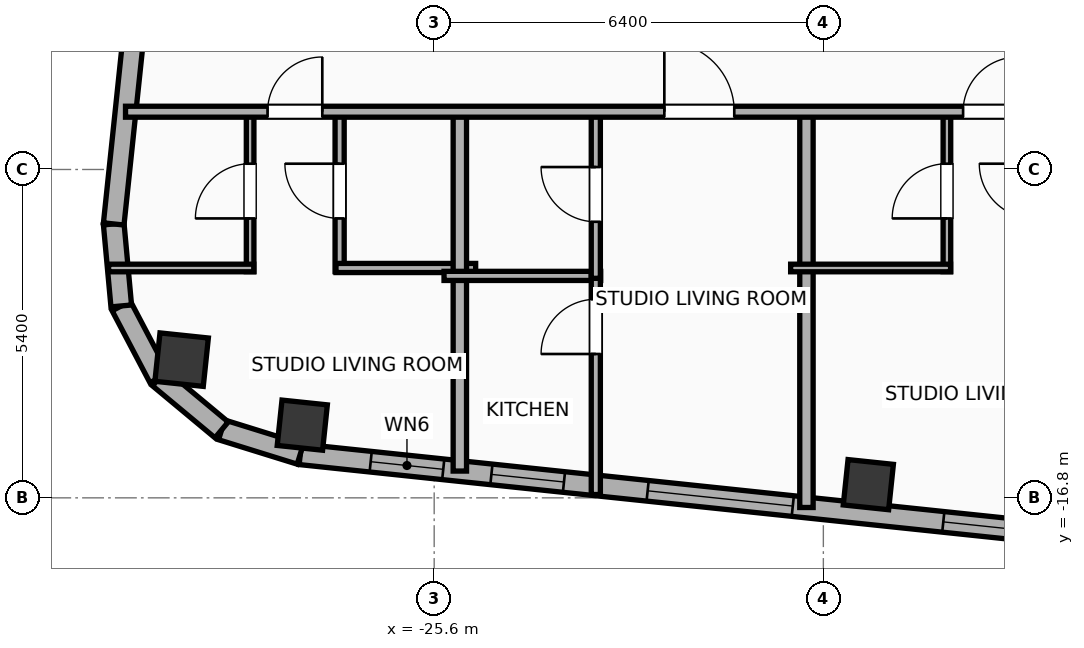
"""IFC4 building model, lengths in metres.
Left out: names, types, materials, properties, quantities, classifications, styles, units other than length and angle.
Written with IfcOpenShell. Run it as: python <this file> out.ifc"""

import sys

from ifc_helpers import new_model, si_unit, direction, frame, frame_2d, origin, origin_2d, place, context, subcontext, project, spatial, rectangle, hollow_rectangle, hollow_circle, extrude, element, fill, save


model = new_model("IFC4")
c1 = context("Model", 3, precision=1e-05, world=origin(), true_north=direction((0.0, 1.0)))
c2 = subcontext(c1, "Body", "Model", "MODEL_VIEW")
j1 = project(units=[si_unit("LENGTHUNIT", "METRE"), si_unit("PLANEANGLEUNIT", "RADIAN")], contexts=[c1])
p1 = place(None, origin())
s1 = spatial("IfcSite", under=j1, at=p1, CompositionType="ELEMENT")
p2 = place(p1, origin())
s2 = spatial("IfcBuilding", under=s1, at=p2, CompositionType="ELEMENT")
p3 = place(p2, frame((0.0, 0.0, 263.9)))
s3 = spatial("IfcBuildingStorey", under=s2, at=p3, CompositionType="ELEMENT", Elevation=263.9)
for number, where, z_axis, x_axis in (
    (1, (-27.769, -15.604, 0.0), (0.0, 0.0, 1.0), (0.995, -0.105, 0.0)),
    (2, (-18.46, -16.583, 0.0), (0.0, 0.0, 1.0), (0.995, -0.105, 0.0)),
):
    element("IfcColumn", number, at=place(p3, frame(where, z_axis=z_axis, x_axis=x_axis)), inside=s3, PredefinedType="COLUMN", context=c2, shape_type="SweptSolid", body=[
        extrude(hollow_rectangle(XDim=0.75, YDim=0.75, WallThickness=0.025, at=origin_2d()), origin(), (0.0, 0.0, 1.0), 3.9),
    ])
p4 = place(p3, frame((-29.753, -14.527, 0.0), z_axis=(0.0, 0.0, 1.0), x_axis=(0.994521895368, -0.104528463268, 0.0)))
e3 = element("IfcColumn", 3, at=p4, inside=s3, PredefinedType="COLUMN", context=c2, shape_type="SweptSolid", body=[
    extrude(hollow_circle(Radius=0.4, WallThickness=0.028, at=origin_2d()), origin(), (0.0, 0.0, 1.0), 3.9),
])
p5 = place(p3, frame((18.708, -20.972, 0.0), z_axis=(0.0, 0.0, 1.0), x_axis=(-0.994521888554, 0.104528528102, 0.0)))
e4 = element("IfcWall", 4, at=p5, inside=s3, PredefinedType="ELEMENTEDWALL", context=c2, shape_type="SweptSolid", body=[
    extrude(rectangle(XDim=46.766, YDim=0.34, at=frame_2d((23.383, 0.0))), origin(), (0.0, 0.0, 1.0), 3.65),
])
p6 = place(p5, frame((23.833, 0.0, 0.75)))
e5 = element("IfcOpeningElement", 5, at=p6, cuts=e4, PredefinedType="OPENING", context=c2, shape_type="SweptSolid", body=[
    extrude(rectangle(XDim=2.4, YDim=2.1, at=frame_2d((1.2, 1.05))), frame((0.0, 0.18, 0.0), z_axis=(0.0, -1.0, 0.0), x_axis=(1.0, 0.0, 0.0)), (0.0, 0.0, 1.0), 0.36),
])
p7 = place(p5, frame((38.622, 0.0, 0.75)))
e6 = element("IfcOpeningElement", 6, at=p7, cuts=e4, PredefinedType="OPENING", context=c2, shape_type="SweptSolid", body=[
    extrude(rectangle(XDim=2.4, YDim=2.1, at=frame_2d((1.2, 1.05))), frame((0.0, 0.18, 0.0), z_axis=(0.0, -1.0, 0.0), x_axis=(1.0, 0.0, 0.0)), (0.0, 0.0, 1.0), 0.36),
])
p8 = place(p5, frame((44.402, 0.0, 0.75)))
e7 = element("IfcOpeningElement", 7, at=p8, cuts=e4, PredefinedType="OPENING", context=c2, shape_type="SweptSolid", body=[
    extrude(rectangle(XDim=1.2, YDim=2.05, at=frame_2d((0.6, 1.025))), frame((0.0, 0.18, 0.0), z_axis=(0.0, -1.0, 0.0), x_axis=(1.0, 0.0, 0.0)), (0.0, 0.0, 1.0), 0.36),
])
p9 = place(p5, frame((42.406, 0.0, 0.75)))
e8 = element("IfcOpeningElement", 8, at=p9, cuts=e4, PredefinedType="OPENING", context=c2, shape_type="SweptSolid", body=[
    extrude(rectangle(XDim=1.2, YDim=2.05, at=frame_2d((0.6, 1.025))), frame((0.0, 0.18, 0.0), z_axis=(0.0, -1.0, 0.0), x_axis=(1.0, 0.0, 0.0)), (0.0, 0.0, 1.0), 0.36),
])
p10 = place(p5, frame((34.933, 0.0, 0.75)))
e9 = element("IfcOpeningElement", 9, at=p10, cuts=e4, PredefinedType="OPENING", context=c2, shape_type="SweptSolid", body=[
    extrude(rectangle(XDim=1.2, YDim=2.05, at=frame_2d((0.6, 1.025))), frame((0.0, 0.18, 0.0), z_axis=(0.0, -1.0, 0.0), x_axis=(1.0, 0.0, 0.0)), (0.0, 0.0, 1.0), 0.36),
])
p11 = place(p5, frame((28.631, 0.0, 0.75)))
e10 = element("IfcOpeningElement", 10, at=p11, cuts=e4, PredefinedType="OPENING", context=c2, shape_type="SweptSolid", body=[
    extrude(rectangle(XDim=1.2, YDim=2.05, at=frame_2d((0.6, 1.025))), frame((0.0, 0.18, 0.0), z_axis=(0.0, -1.0, 0.0), x_axis=(1.0, 0.0, 0.0)), (0.0, 0.0, 1.0), 0.36),
])
p12 = place(p5, frame((30.896, 0.0, 0.75)))
e11 = element("IfcOpeningElement", 11, at=p12, cuts=e4, PredefinedType="OPENING", context=c2, shape_type="SweptSolid", body=[
    extrude(rectangle(XDim=1.2, YDim=2.05, at=frame_2d((0.6, 1.025))), frame((0.0, 0.18, 0.0), z_axis=(0.0, -1.0, 0.0), x_axis=(1.0, 0.0, 0.0)), (0.0, 0.0, 1.0), 0.36),
])
p13 = place(p5, frame((7.501, 0.0, 0.75)))
e12 = element("IfcOpeningElement", 12, at=p13, cuts=e4, PredefinedType="OPENING", context=c2, shape_type="SweptSolid", body=[
    extrude(rectangle(XDim=1.2, YDim=2.05, at=frame_2d((0.6, 1.025))), frame((0.0, 0.18, 0.0), z_axis=(0.0, -1.0, 0.0), x_axis=(1.0, 0.0, 0.0)), (0.0, 0.0, 1.0), 0.36),
])
p14 = place(p5, frame((4.159, 0.0, 0.75)))
e13 = element("IfcOpeningElement", 13, at=p14, cuts=e4, PredefinedType="OPENING", context=c2, shape_type="SweptSolid", body=[
    extrude(rectangle(XDim=1.2, YDim=2.05, at=frame_2d((0.6, 1.025))), frame((0.0, 0.18, 0.0), z_axis=(0.0, -1.0, 0.0), x_axis=(1.0, 0.0, 0.0)), (0.0, 0.0, 1.0), 0.36),
])
p15 = place(p5, frame((1.369, 0.0, 0.75)))
e14 = element("IfcOpeningElement", 14, at=p15, cuts=e4, PredefinedType="OPENING", context=c2, shape_type="SweptSolid", body=[
    extrude(rectangle(XDim=1.2, YDim=2.05, at=frame_2d((0.6, 1.025))), frame((0.0, 0.18, 0.0), z_axis=(0.0, -1.0, 0.0), x_axis=(1.0, 0.0, 0.0)), (0.0, 0.0, 1.0), 0.36),
])
p16 = place(p5, frame((20.254, 0.0, 0.75)))
e15 = element("IfcOpeningElement", 15, at=p16, cuts=e4, PredefinedType="OPENING", context=c2, shape_type="SweptSolid", body=[
    extrude(rectangle(XDim=1.2, YDim=2.05, at=frame_2d((0.6, 1.025))), frame((0.0, 0.18, 0.0), z_axis=(0.0, -1.0, 0.0), x_axis=(1.0, 0.0, 0.0)), (0.0, 0.0, 1.0), 0.36),
])
p17 = place(p5, frame((16.172, 0.0, 0.75)))
e16 = element("IfcOpeningElement", 16, at=p17, cuts=e4, PredefinedType="OPENING", context=c2, shape_type="SweptSolid", body=[
    extrude(rectangle(XDim=1.2, YDim=2.05, at=frame_2d((0.6, 1.025))), frame((0.0, 0.18, 0.0), z_axis=(0.0, -1.0, 0.0), x_axis=(1.0, 0.0, 0.0)), (0.0, 0.0, 1.0), 0.36),
])
p18 = place(p5, frame((12.11, 0.0, 0.75)))
e17 = element("IfcOpeningElement", 17, at=p18, cuts=e4, PredefinedType="OPENING", context=c2, shape_type="SweptSolid", body=[
    extrude(rectangle(XDim=1.2, YDim=2.05, at=frame_2d((0.6, 1.025))), frame((0.0, 0.18, 0.0), z_axis=(0.0, -1.0, 0.0), x_axis=(1.0, 0.0, 0.0)), (0.0, 0.0, 1.0), 0.36),
])
p19 = place(p3, frame((-27.802, -16.084, 0.0), z_axis=(0.0, 0.0, 1.0), x_axis=(-0.955007802701, 0.296580674994, 0.0)))
e18 = element("IfcWall", 18, at=p19, inside=s3, PredefinedType="ELEMENTEDWALL", context=c2, shape_type="SweptSolid", body=[
    extrude(rectangle(XDim=1.354, YDim=0.34, at=frame_2d((0.677, 0.0))), origin(), (0.0, 0.0, 1.0), 3.65),
])
p20 = place(p3, frame((-29.096, -15.682, 0.0), z_axis=(0.0, 0.0, 1.0), x_axis=(-0.768864427906, 0.639411832469, 0.0)))
e19 = element("IfcWall", 19, at=p20, inside=s3, PredefinedType="ELEMENTEDWALL", context=c2, shape_type="SweptSolid", body=[
    extrude(rectangle(XDim=1.337, YDim=0.34, at=frame_2d((0.668, 0.0))), origin(), (0.0, 0.0, 1.0), 3.65),
])
p21 = place(p3, frame((-30.124, -14.827, 0.0), z_axis=(0.0, 0.0, 1.0), x_axis=(-0.465528132217, 0.885033083062, 0.0)))
e20 = element("IfcWall", 20, at=p21, inside=s3, PredefinedType="ELEMENTEDWALL", context=c2, shape_type="SweptSolid", body=[
    extrude(rectangle(XDim=1.337, YDim=0.34, at=frame_2d((0.668, 0.0))), origin(), (0.0, 0.0, 1.0), 3.65),
])
p22 = place(p3, frame((-30.746, -13.644, 0.0), z_axis=(0.0, 0.0, 1.0), x_axis=(-0.091592370975, 0.995796584438, 0.0)))
e21 = element("IfcWall", 21, at=p22, inside=s3, PredefinedType="ELEMENTEDWALL", context=c2, shape_type="SweptSolid", body=[
    extrude(rectangle(XDim=1.354, YDim=0.34, at=frame_2d((0.677, 0.0))), origin(), (0.0, 0.0, 1.0), 3.65),
])
p23 = place(p3, frame((-30.87, -12.296, 0.0), z_axis=(0.0, 0.0, 1.0), x_axis=(0.104533282919, 0.994521388791, 0.0)))
e22 = element("IfcWall", 22, at=p23, inside=s3, PredefinedType="ELEMENTEDWALL", context=c2, shape_type="SweptSolid", body=[
    extrude(rectangle(XDim=30.366, YDim=0.34, at=frame_2d((15.183, 0.0))), origin(), (0.0, 0.0, 1.0), 3.65),
])
p24 = place(p23, frame((5.842, 0.0, 0.75)))
e23 = element("IfcOpeningElement", 23, at=p24, cuts=e22, PredefinedType="OPENING", context=c2, shape_type="SweptSolid", body=[
    extrude(rectangle(XDim=1.8, YDim=2.1, at=frame_2d((0.9, 1.05))), frame((0.0, 0.18, 0.0), z_axis=(0.0, -1.0, 0.0), x_axis=(1.0, 0.0, 0.0)), (0.0, 0.0, 1.0), 0.36),
])
p25 = place(p23, frame((26.861, 0.0, 0.75)))
e24 = element("IfcOpeningElement", 24, at=p25, cuts=e22, PredefinedType="OPENING", context=c2, shape_type="SweptSolid", body=[
    extrude(rectangle(XDim=1.2, YDim=2.05, at=frame_2d((0.6, 1.025))), frame((0.0, 0.18, 0.0), z_axis=(0.0, -1.0, 0.0), x_axis=(1.0, 0.0, 0.0)), (0.0, 0.0, 1.0), 0.36),
])
p26 = place(p23, frame((16.311, 0.0, 0.75)))
e25 = element("IfcOpeningElement", 25, at=p26, cuts=e22, PredefinedType="OPENING", context=c2, shape_type="SweptSolid", body=[
    extrude(rectangle(XDim=1.2, YDim=2.05, at=frame_2d((0.6, 1.025))), frame((0.0, 0.18, 0.0), z_axis=(0.0, -1.0, 0.0), x_axis=(1.0, 0.0, 0.0)), (0.0, 0.0, 1.0), 0.36),
])
p27 = place(p3, frame((-28.627, -13.08, 0.0), z_axis=(0.0, 0.0, 1.0), x_axis=(0.0, 1.0, 0.0)))
e26 = element("IfcWall", 26, at=p27, inside=s3, PredefinedType="PARTITIONING", context=c2, shape_type="SweptSolid", body=[
    extrude(rectangle(XDim=2.65, YDim=0.125, at=frame_2d((1.325, 0.0))), origin(), (0.0, 0.0, 1.0), 3.65),
])
p28 = place(p27, frame((0.875, 0.0, 0.0)))
e27 = element("IfcOpeningElement", 27, at=p28, cuts=e26, PredefinedType="OPENING", context=c2, shape_type="SweptSolid", body=[
    extrude(rectangle(XDim=0.9, YDim=2.05, at=frame_2d((0.45, 1.025))), frame((0.0, 0.073, 0.0), z_axis=(0.0, -1.0, 0.0), x_axis=(1.0, 0.0, 0.0)), (0.0, 0.0, 1.0), 0.145),
])
p29 = place(p3, frame((-27.155, -13.08, 0.0), z_axis=(0.0, 0.0, 1.0), x_axis=(0.0, 1.0, 0.0)))
e28 = element("IfcWall", 28, at=p29, inside=s3, PredefinedType="PLUMBINGWALL", context=c2, shape_type="SweptSolid", body=[
    extrude(rectangle(XDim=2.65, YDim=0.15, at=frame_2d((1.325, 0.0))), origin(), (0.0, 0.0, 1.0), 3.65),
])
p30 = place(p29, frame((0.875, 0.0, 0.0)))
e29 = element("IfcOpeningElement", 29, at=p30, cuts=e28, PredefinedType="OPENING", context=c2, shape_type="SweptSolid", body=[
    extrude(rectangle(XDim=0.9, YDim=2.05, at=frame_2d((0.45, 1.025))), frame((0.0, 0.085, 0.0), z_axis=(0.0, -1.0, 0.0), x_axis=(1.0, 0.0, 0.0)), (0.0, 0.0, 1.0), 0.17),
])
p31 = place(p3, frame((-30.954, -13.02, 0.0), z_axis=(0.0, 0.0, 1.0), x_axis=(1.0, 0.0, 0.0)))
e30 = element("IfcWall", 30, at=p31, inside=s3, PredefinedType="PARTITIONING", context=c2, shape_type="SweptSolid", body=[
    extrude(rectangle(XDim=2.387, YDim=0.125, at=frame_2d((1.194, 0.0))), origin(), (0.0, 0.0, 1.0), 3.65),
])
p32 = place(p3, frame((-27.215, -13.02, 0.0), z_axis=(0.0, 0.0, 1.0), x_axis=(1.0, 0.0, 0.0)))
e31 = element("IfcWall", 31, at=p32, inside=s3, PredefinedType="PLUMBINGWALL", context=c2, shape_type="SweptSolid", body=[
    extrude(rectangle(XDim=2.297, YDim=0.15, at=frame_2d((1.148, 0.0))), origin(), (0.0, 0.0, 1.0), 3.65),
])
p33 = place(p3, frame((-25.178, -16.36, 0.0), z_axis=(0.0, 0.0, 1.0), x_axis=(0.0, 1.0, 0.0)))
e32 = element("IfcWall", 32, at=p33, inside=s3, PredefinedType="PARTITIONING", context=c2, shape_type="SweptSolid", body=[
    extrude(rectangle(XDim=5.99, YDim=0.22, at=frame_2d((2.995, 0.0))), origin(), (0.0, 0.0, 1.0), 3.65),
])
p34 = place(p3, frame((-25.438, -13.15, 0.0), z_axis=(0.0, 0.0, 1.0), x_axis=(1.0, 0.0, 0.0)))
e33 = element("IfcWall", 33, at=p34, inside=s3, PredefinedType="PLUMBINGWALL", context=c2, shape_type="SweptSolid", body=[
    extrude(rectangle(XDim=2.576, YDim=0.15, at=frame_2d((1.288, 0.0))), origin(), (0.0, 0.0, 1.0), 3.65),
])
p35 = place(p3, frame((-22.942, -16.745, 0.0), z_axis=(0.0, 0.0, 1.0), x_axis=(0.0, 1.0, 0.0)))
e34 = element("IfcWall", 34, at=p35, inside=s3, PredefinedType="PLUMBINGWALL", context=c2, shape_type="SweptSolid", body=[
    extrude(rectangle(XDim=3.635, YDim=0.15, at=frame_2d((1.818, 0.0))), origin(), (0.0, 0.0, 1.0), 3.65),
])
p36 = place(p35, frame((2.311, 0.0, 0.0)))
e35 = element("IfcOpeningElement", 35, at=p36, cuts=e34, PredefinedType="OPENING", context=c2, shape_type="SweptSolid", body=[
    extrude(rectangle(XDim=0.9, YDim=2.05, at=frame_2d((0.45, 1.025))), frame((0.0, 0.085, 0.0), z_axis=(0.0, -1.0, 0.0), x_axis=(1.0, 0.0, 0.0)), (0.0, 0.0, 1.0), 0.17),
])
p37 = place(p3, frame((-22.942, -13.19, 0.0), z_axis=(0.0, 0.0, 1.0), x_axis=(0.0, 1.0, 0.0)))
e36 = element("IfcWall", 36, at=p37, inside=s3, PredefinedType="PLUMBINGWALL", context=c2, shape_type="SweptSolid", body=[
    extrude(rectangle(XDim=2.76, YDim=0.15, at=frame_2d((1.38, 0.0))), origin(), (0.0, 0.0, 1.0), 3.65),
])
p38 = place(p37, frame((0.93, 0.0, 0.0)))
e37 = element("IfcOpeningElement", 37, at=p38, cuts=e36, PredefinedType="OPENING", context=c2, shape_type="SweptSolid", body=[
    extrude(rectangle(XDim=0.9, YDim=2.05, at=frame_2d((0.45, 1.025))), frame((0.0, 0.085, 0.0), z_axis=(0.0, -1.0, 0.0), x_axis=(1.0, 0.0, 0.0)), (0.0, 0.0, 1.0), 0.17),
])
p39 = place(p3, frame((-19.478, -16.959, 0.0), z_axis=(0.0, 0.0, 1.0), x_axis=(0.0, 1.0, 0.0)))
e38 = element("IfcWall", 38, at=p39, inside=s3, PredefinedType="PARTITIONING", context=c2, shape_type="SweptSolid", body=[
    extrude(rectangle(XDim=6.589, YDim=0.22, at=frame_2d((3.294, 0.0))), origin(), (0.0, 0.0, 1.0), 3.65),
])
p40 = place(p3, frame((-17.168, -13.08, 0.0), z_axis=(0.0, 0.0, 1.0), x_axis=(0.0, 1.0, 0.0)))
e39 = element("IfcWall", 39, at=p40, inside=s3, PredefinedType="PARTITIONING", context=c2, shape_type="SweptSolid", body=[
    extrude(rectangle(XDim=2.65, YDim=0.125, at=frame_2d((1.325, 0.0))), origin(), (0.0, 0.0, 1.0), 3.65),
])
p41 = place(p40, frame((0.875, 0.0, 0.0)))
e40 = element("IfcOpeningElement", 40, at=p41, cuts=e39, PredefinedType="OPENING", context=c2, shape_type="SweptSolid", body=[
    extrude(rectangle(XDim=0.9, YDim=2.05, at=frame_2d((0.45, 1.025))), frame((0.0, 0.073, 0.0), z_axis=(0.0, -1.0, 0.0), x_axis=(1.0, 0.0, 0.0)), (0.0, 0.0, 1.0), 0.145),
])
p42 = place(p3, frame((-19.738, -13.02, 0.0), z_axis=(0.0, 0.0, 1.0), x_axis=(1.0, 0.0, 0.0)))
e41 = element("IfcWall", 41, at=p42, inside=s3, PredefinedType="PARTITIONING", context=c2, shape_type="SweptSolid", body=[
    extrude(rectangle(XDim=2.63, YDim=0.125, at=frame_2d((1.315, 0.0))), origin(), (0.0, 0.0, 1.0), 3.65),
])
p43 = place(p3, frame((-30.676, -10.45, 0.0), z_axis=(0.0, 0.0, 1.0), x_axis=(1.0, 0.0, 0.0)))
e42 = element("IfcWall", 42, at=p43, inside=s3, PredefinedType="PARTITIONING", context=c2, shape_type="SweptSolid", body=[
    extrude(rectangle(XDim=22.596, YDim=0.18, at=frame_2d((11.298, 0.0))), origin(), (0.0, 0.0, 1.0), 3.65),
])
p44 = place(p43, frame((2.336, 0.0, 0.0)))
e43 = element("IfcOpeningElement", 43, at=p44, cuts=e42, PredefinedType="OPENING", context=c2, shape_type="SweptSolid", body=[
    extrude(rectangle(XDim=0.9, YDim=2.05, at=frame_2d((0.45, 1.025))), frame((0.0, 0.1, 0.0), z_axis=(0.0, -1.0, 0.0), x_axis=(1.0, 0.0, 0.0)), (0.0, 0.0, 1.0), 0.2),
])
p45 = place(p43, frame((8.861, 0.0, 0.0)))
e44 = element("IfcOpeningElement", 44, at=p45, cuts=e42, PredefinedType="OPENING", context=c2, shape_type="SweptSolid", body=[
    extrude(rectangle(XDim=1.15, YDim=2.05, at=frame_2d((0.575, 1.025))), frame((0.0, 0.1, 0.0), z_axis=(0.0, -1.0, 0.0), x_axis=(1.0, 0.0, 0.0)), (0.0, 0.0, 1.0), 0.2),
])
p46 = place(p43, frame((13.774, 0.0, 0.0)))
e45 = element("IfcOpeningElement", 45, at=p46, cuts=e42, PredefinedType="OPENING", context=c2, shape_type="SweptSolid", body=[
    extrude(rectangle(XDim=0.9, YDim=2.05, at=frame_2d((0.45, 1.025))), frame((0.0, 0.1, 0.0), z_axis=(0.0, -1.0, 0.0), x_axis=(1.0, 0.0, 0.0)), (0.0, 0.0, 1.0), 0.2),
])
p47 = place(p43, frame((20.306, 0.0, 0.0)))
e46 = element("IfcOpeningElement", 46, at=p47, cuts=e42, PredefinedType="OPENING", context=c2, shape_type="SweptSolid", body=[
    extrude(rectangle(XDim=1.15, YDim=2.05, at=frame_2d((0.575, 1.025))), frame((0.0, 0.1, 0.0), z_axis=(0.0, -1.0, 0.0), x_axis=(1.0, 0.0, 0.0)), (0.0, 0.0, 1.0), 0.2),
])
p48 = place(p7, origin())
e47 = element("IfcWindow", 47, at=p48, inside=s3, PartitioningType="SINGLE_PANEL", PredefinedType="WINDOW", context=c2, shape_type="SweptSolid", body=[
    extrude(rectangle(XDim=2.4, YDim=2.1, at=frame_2d((1.2, 1.05))), frame((0.0, 0.03, 0.0), z_axis=(0.0, -1.0, 0.0), x_axis=(1.0, 0.0, 0.0)), (0.0, 0.0, 1.0), 0.06),
])
fill(e6, e47)
p49 = place(p8, origin())
e48 = element("IfcWindow", 48, at=p49, inside=s3, PartitioningType="SINGLE_PANEL", PredefinedType="WINDOW", context=c2, shape_type="SweptSolid", body=[
    extrude(rectangle(XDim=1.2, YDim=2.05, at=frame_2d((0.6, 1.025))), frame((0.0, 0.03, 0.0), z_axis=(0.0, -1.0, 0.0), x_axis=(1.0, 0.0, 0.0)), (0.0, 0.0, 1.0), 0.06),
])
fill(e7, e48)
p50 = place(p9, origin())
e49 = element("IfcWindow", 49, at=p50, inside=s3, PartitioningType="SINGLE_PANEL", PredefinedType="WINDOW", context=c2, shape_type="SweptSolid", body=[
    extrude(rectangle(XDim=1.2, YDim=2.05, at=frame_2d((0.6, 1.025))), frame((0.0, 0.03, 0.0), z_axis=(0.0, -1.0, 0.0), x_axis=(1.0, 0.0, 0.0)), (0.0, 0.0, 1.0), 0.06),
])
fill(e8, e49)
p51 = place(p10, origin())
e50 = element("IfcWindow", 50, at=p51, inside=s3, PartitioningType="SINGLE_PANEL", PredefinedType="WINDOW", context=c2, shape_type="SweptSolid", body=[
    extrude(rectangle(XDim=1.2, YDim=2.05, at=frame_2d((0.6, 1.025))), frame((0.0, 0.03, 0.0), z_axis=(0.0, -1.0, 0.0), x_axis=(1.0, 0.0, 0.0)), (0.0, 0.0, 1.0), 0.06),
])
fill(e9, e50)
p52 = place(p28, origin())
e51 = element("IfcDoor", 51, at=p52, inside=s3, OperationType="SINGLE_SWING_LEFT", PredefinedType="DOOR", context=c2, shape_type="SweptSolid", body=[
    extrude(rectangle(XDim=0.9, YDim=2.05, at=frame_2d((0.45, 1.025))), frame((0.0, 0.025, 0.0), z_axis=(0.0, -1.0, 0.0), x_axis=(1.0, 0.0, 0.0)), (0.0, 0.0, 1.0), 0.05),
])
fill(e27, e51)
p53 = place(p30, origin())
e52 = element("IfcDoor", 52, at=p53, inside=s3, OperationType="SINGLE_SWING_RIGHT", PredefinedType="DOOR", context=c2, shape_type="SweptSolid", body=[
    extrude(rectangle(XDim=0.9, YDim=2.05, at=frame_2d((0.45, 1.025))), frame((0.0, 0.025, 0.0), z_axis=(0.0, -1.0, 0.0), x_axis=(1.0, 0.0, 0.0)), (0.0, 0.0, 1.0), 0.05),
])
fill(e29, e52)
p54 = place(p36, origin())
e53 = element("IfcDoor", 53, at=p54, inside=s3, OperationType="SINGLE_SWING_LEFT", PredefinedType="DOOR", context=c2, shape_type="SweptSolid", body=[
    extrude(rectangle(XDim=0.9, YDim=2.05, at=frame_2d((0.45, 1.025))), frame((0.0, 0.025, 0.0), z_axis=(0.0, -1.0, 0.0), x_axis=(1.0, 0.0, 0.0)), (0.0, 0.0, 1.0), 0.05),
])
fill(e35, e53)
p55 = place(p38, origin())
e54 = element("IfcDoor", 54, at=p55, inside=s3, OperationType="SINGLE_SWING_RIGHT", PredefinedType="DOOR", context=c2, shape_type="SweptSolid", body=[
    extrude(rectangle(XDim=0.9, YDim=2.05, at=frame_2d((0.45, 1.025))), frame((0.0, 0.025, 0.0), z_axis=(0.0, -1.0, 0.0), x_axis=(1.0, 0.0, 0.0)), (0.0, 0.0, 1.0), 0.05),
])
fill(e37, e54)
p56 = place(p41, origin())
e55 = element("IfcDoor", 55, at=p56, inside=s3, OperationType="SINGLE_SWING_LEFT", PredefinedType="DOOR", context=c2, shape_type="SweptSolid", body=[
    extrude(rectangle(XDim=0.9, YDim=2.05, at=frame_2d((0.45, 1.025))), frame((0.0, 0.025, 0.0), z_axis=(0.0, -1.0, 0.0), x_axis=(1.0, 0.0, 0.0)), (0.0, 0.0, 1.0), 0.05),
])
fill(e40, e55)
p57 = place(p44, origin())
e56 = element("IfcDoor", 56, at=p57, inside=s3, OperationType="SINGLE_SWING_RIGHT", PredefinedType="DOOR", context=c2, shape_type="SweptSolid", body=[
    extrude(rectangle(XDim=0.9, YDim=2.05, at=frame_2d((0.45, 1.025))), frame((0.0, 0.025, 0.0), z_axis=(0.0, -1.0, 0.0), x_axis=(1.0, 0.0, 0.0)), (0.0, 0.0, 1.0), 0.05),
])
fill(e43, e56)
p58 = place(p45, origin())
e57 = element("IfcDoor", 57, at=p58, inside=s3, OperationType="SINGLE_SWING_LEFT", PredefinedType="DOOR", context=c2, shape_type="SweptSolid", body=[
    extrude(rectangle(XDim=1.15, YDim=2.05, at=frame_2d((0.575, 1.025))), frame((0.0, 0.025, 0.0), z_axis=(0.0, -1.0, 0.0), x_axis=(1.0, 0.0, 0.0)), (0.0, 0.0, 1.0), 0.05),
])
fill(e44, e57)
p59 = place(p46, origin())
e58 = element("IfcDoor", 58, at=p59, inside=s3, OperationType="SINGLE_SWING_RIGHT", PredefinedType="DOOR", context=c2, shape_type="SweptSolid", body=[
    extrude(rectangle(XDim=0.9, YDim=2.05, at=frame_2d((0.45, 1.025))), frame((0.0, 0.025, 0.0), z_axis=(0.0, -1.0, 0.0), x_axis=(1.0, 0.0, 0.0)), (0.0, 0.0, 1.0), 0.05),
])
fill(e45, e58)
save(model, sys.argv[1])
